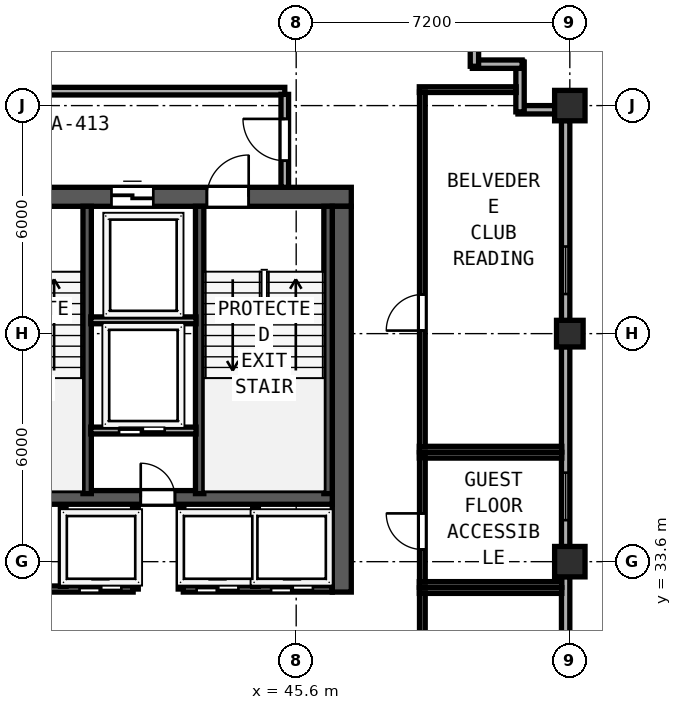
"""IFC4 building model, lengths in metres.
Left out: names, types, materials, properties, quantities, classifications, styles, units other than length and angle.
Written with IfcOpenShell. Run it as: python <this file> out.ifc"""

import sys

from ifc_helpers import new_model, si_unit, direction, frame, frame_2d, origin, origin_2d, place, context, subcontext, project, spatial, rectangle, hollow_rectangle, extrude, element, fill, save


model = new_model("IFC4")
c1 = context("Model", 3, precision=1e-05, world=origin(), true_north=direction((0.0, 1.0)))
c2 = subcontext(c1, "Body", "Model", "MODEL_VIEW")
j1 = project(units=[si_unit("LENGTHUNIT", "METRE"), si_unit("PLANEANGLEUNIT", "RADIAN")], contexts=[c1])
p1 = place(None, origin())
s1 = spatial("IfcSite", under=j1, at=p1, CompositionType="ELEMENT")
p2 = place(p1, origin())
s2 = spatial("IfcBuilding", under=s1, at=p2, CompositionType="ELEMENT")
p3 = place(p2, frame((0.0, 0.0, 239.05)))
s3 = spatial("IfcBuildingStorey", under=s2, at=p3, CompositionType="ELEMENT", Elevation=239.05)
p4 = place(p3, frame((29.75, 43.2, 0.0), z_axis=(0.0, 0.0, 1.0), x_axis=(1.0, 0.0, 0.0)))
e1 = element("IfcWall", 1, at=p4, inside=s3, PredefinedType="SHEAR", context=c2, shape_type="SweptSolid", body=[
    extrude(rectangle(XDim=17.3, YDim=0.5, at=frame_2d((8.65, 0.0))), origin(), (0.0, 0.0, 1.0), 3.67),
])
p5 = place(p4, frame((2.3, 0.0, 0.0)))
e2 = element("IfcOpeningElement", 2, at=p5, cuts=e1, PredefinedType="OPENING", context=c2, shape_type="SweptSolid", body=[
    extrude(rectangle(XDim=1.1, YDim=2.15, at=frame_2d((0.55, 1.075))), frame((0.0, 0.26, 0.0), z_axis=(0.0, -1.0, 0.0), x_axis=(1.0, 0.0, 0.0)), (0.0, 0.0, 1.0), 0.52),
])
p6 = place(p4, frame((7.41, 0.0, 0.0)))
e3 = element("IfcOpeningElement", 3, at=p6, cuts=e1, PredefinedType="OPENING", context=c2, shape_type="SweptSolid", body=[
    extrude(rectangle(XDim=1.1, YDim=2.15, at=frame_2d((0.55, 1.075))), frame((0.0, 0.26, 0.0), z_axis=(0.0, -1.0, 0.0), x_axis=(1.0, 0.0, 0.0)), (0.0, 0.0, 1.0), 0.52),
])
p7 = place(p4, frame((13.5, 0.0, 0.0)))
e4 = element("IfcOpeningElement", 4, at=p7, cuts=e1, PredefinedType="OPENING", context=c2, shape_type="SweptSolid", body=[
    extrude(rectangle(XDim=1.1, YDim=2.15, at=frame_2d((0.55, 1.075))), frame((0.0, 0.26, 0.0), z_axis=(0.0, -1.0, 0.0), x_axis=(1.0, 0.0, 0.0)), (0.0, 0.0, 1.0), 0.52),
])
p8 = place(p4, frame((4.63, 0.0, 0.0)))
e5 = element("IfcOpeningElement", 5, at=p8, cuts=e1, PredefinedType="OPENING", context=c2, shape_type="SweptSolid", body=[
    extrude(rectangle(XDim=1.1, YDim=2.2, at=frame_2d((0.55, 1.1))), frame((0.0, 0.26, 0.0), z_axis=(0.0, -1.0, 0.0), x_axis=(1.0, 0.0, 0.0)), (0.0, 0.0, 1.0), 0.52),
])
p9 = place(p4, frame((10.99, 0.0, 0.0)))
e6 = element("IfcOpeningElement", 6, at=p9, cuts=e1, PredefinedType="OPENING", context=c2, shape_type="SweptSolid", body=[
    extrude(rectangle(XDim=1.1, YDim=2.2, at=frame_2d((0.55, 1.1))), frame((0.0, 0.26, 0.0), z_axis=(0.0, -1.0, 0.0), x_axis=(1.0, 0.0, 0.0)), (0.0, 0.0, 1.0), 0.52),
])
p10 = place(p3, frame((46.8, 32.8, 0.0), z_axis=(0.0, 0.0, 1.0), x_axis=(0.0, 1.0, 0.0)))
e7 = element("IfcWall", 7, at=p10, inside=s3, PredefinedType="SHEAR", context=c2, shape_type="SweptSolid", body=[
    extrude(rectangle(XDim=10.15, YDim=0.5, at=frame_2d((5.075, 0.0))), origin(), (0.0, 0.0, 1.0), 3.67),
])
p11 = place(p3, frame((30.25, 35.29, 0.0), z_axis=(0.0, 0.0, 1.0), x_axis=(1.0, 0.0, 0.0)))
e8 = element("IfcWall", 8, at=p11, inside=s3, PredefinedType="SHEAR", context=c2, shape_type="SweptSolid", body=[
    extrude(rectangle(XDim=16.3, YDim=0.36, at=frame_2d((8.15, 0.0))), origin(), (0.0, 0.0, 1.0), 3.67),
])
p12 = place(p11, frame((5.1, 0.0, 0.0), z_axis=(0.0, 0.0, 1.0), x_axis=(-1.0, 0.0, 0.0)))
e9 = element("IfcOpeningElement", 9, at=p12, cuts=e8, PredefinedType="OPENING", context=c2, shape_type="SweptSolid", body=[
    extrude(rectangle(XDim=0.9, YDim=2.1, at=frame_2d((0.45, 1.05))), frame((0.0, 0.19, 0.0), z_axis=(0.0, -1.0, 0.0), x_axis=(1.0, 0.0, 0.0)), (0.0, 0.0, 1.0), 0.38),
])
p13 = place(p11, frame((12.16, 0.0, 0.0), z_axis=(0.0, 0.0, 1.0), x_axis=(-1.0, 0.0, 0.0)))
e10 = element("IfcOpeningElement", 10, at=p13, cuts=e8, PredefinedType="OPENING", context=c2, shape_type="SweptSolid", body=[
    extrude(rectangle(XDim=0.9, YDim=2.1, at=frame_2d((0.45, 1.05))), frame((0.0, 0.19, 0.0), z_axis=(0.0, -1.0, 0.0), x_axis=(1.0, 0.0, 0.0)), (0.0, 0.0, 1.0), 0.38),
])
for number, where, z_axis, x_axis in (
    (11, (40.1, 35.39, 0.0), (0.0, 0.0, 1.0), (0.0, 1.0, 0.0)),
    (12, (43.06, 35.39, 0.0), (0.0, 0.0, 1.0), (0.0, 1.0, 0.0)),
    (13, (46.438, 35.39, 0.0), (0.0, 0.0, 1.0), (0.0, 1.0, 0.0)),
):
    element("IfcWall", number, at=place(p3, frame(where, z_axis=z_axis, x_axis=x_axis)), inside=s3, PredefinedType="SHEAR", context=c2, shape_type="SweptSolid", body=[
        extrude(rectangle(XDim=7.56, YDim=0.22, at=frame_2d((3.78, 0.0))), origin(), (0.0, 0.0, 1.0), 3.67),
    ])
for number, where, z_axis, x_axis in (
    (14, (52.8, 33.6, 0.0), (0.0, 0.0, 1.0), (1.0, 0.0, 0.0)),
    (15, (52.8, 45.6, 0.0), (0.0, 0.0, 1.0), (1.0, 0.0, 0.0)),
):
    element("IfcColumn", number, at=place(p3, frame(where, z_axis=z_axis, x_axis=x_axis)), inside=s3, PredefinedType="COLUMN", context=c2, shape_type="SweptSolid", body=[
        extrude(hollow_rectangle(XDim=0.8, YDim=0.8, WallThickness=0.03, at=origin_2d()), origin(), (0.0, 0.0, 1.0), 3.85),
    ])
p14 = place(p3, frame((52.8, 39.6, 0.0), z_axis=(0.0, 0.0, 1.0), x_axis=(1.0, 0.0, 0.0)))
e16 = element("IfcColumn", 16, at=p14, inside=s3, PredefinedType="COLUMN", context=c2, shape_type="SweptSolid", body=[
    extrude(hollow_rectangle(XDim=0.7, YDim=0.7, WallThickness=0.026, at=origin_2d()), origin(), (0.0, 0.0, 1.0), 3.85),
])
p15 = place(p3, frame((52.69, 27.942, 0.0), z_axis=(0.0, 0.0, 1.0), x_axis=(0.0, 1.0, 0.0)))
e17 = element("IfcWall", 17, at=p15, inside=s3, PredefinedType="SOLIDWALL", context=c2, shape_type="SweptSolid", body=[
    extrude(rectangle(XDim=5.266, YDim=0.22, at=frame_2d((2.633, 0.0))), origin(), (0.0, 0.0, 1.0), 3.315),
])
p16 = place(p15, frame((0.7, 0.0, 0.85)))
e18 = element("IfcOpeningElement", 18, at=p16, cuts=e17, PredefinedType="OPENING", context=c2, shape_type="SweptSolid", body=[
    extrude(rectangle(XDim=1.25, YDim=1.95, at=frame_2d((0.625, 0.975))), frame((0.0, 0.12, 0.0), z_axis=(0.0, -1.0, 0.0), x_axis=(1.0, 0.0, 0.0)), (0.0, 0.0, 1.0), 0.24),
])
p17 = place(p3, frame((52.69, 33.992, 0.0), z_axis=(0.0, 0.0, 1.0), x_axis=(0.0, 1.0, 0.0)))
e19 = element("IfcWall", 19, at=p17, inside=s3, PredefinedType="SOLIDWALL", context=c2, shape_type="SweptSolid", body=[
    extrude(rectangle(XDim=5.266, YDim=0.22, at=frame_2d((2.633, 0.0))), origin(), (0.0, 0.0, 1.0), 3.315),
])
p18 = place(p17, frame((0.7, 0.0, 0.85)))
e20 = element("IfcOpeningElement", 20, at=p18, cuts=e19, PredefinedType="OPENING", context=c2, shape_type="SweptSolid", body=[
    extrude(rectangle(XDim=1.25, YDim=1.95, at=frame_2d((0.625, 0.975))), frame((0.0, 0.12, 0.0), z_axis=(0.0, -1.0, 0.0), x_axis=(1.0, 0.0, 0.0)), (0.0, 0.0, 1.0), 0.24),
])
p19 = place(p3, frame((52.69, 39.942, 0.0), z_axis=(0.0, 0.0, 1.0), x_axis=(0.0, 1.0, 0.0)))
e21 = element("IfcWall", 21, at=p19, inside=s3, PredefinedType="SOLIDWALL", context=c2, shape_type="SweptSolid", body=[
    extrude(rectangle(XDim=5.266, YDim=0.22, at=frame_2d((2.633, 0.0))), origin(), (0.0, 0.0, 1.0), 3.315),
])
p20 = place(p19, frame((0.7, 0.0, 0.85)))
e22 = element("IfcOpeningElement", 22, at=p20, cuts=e21, PredefinedType="OPENING", context=c2, shape_type="SweptSolid", body=[
    extrude(rectangle(XDim=1.25, YDim=1.95, at=frame_2d((0.625, 0.975))), frame((0.0, 0.12, 0.0), z_axis=(0.0, -1.0, 0.0), x_axis=(1.0, 0.0, 0.0)), (0.0, 0.0, 1.0), 0.24),
])
p21 = place(p3, frame((52.408, 45.49, 0.0), z_axis=(0.0, 0.0, 1.0), x_axis=(-1.0, 0.0, 0.0)))
e23 = element("IfcWall", 23, at=p21, inside=s3, PredefinedType="SOLIDWALL", context=c2, shape_type="SweptSolid", body=[
    extrude(rectangle(XDim=0.973, YDim=0.22, at=frame_2d((0.486, 0.0))), origin(), (0.0, 0.0, 1.0), 3.67),
])
p22 = place(p3, frame((51.49, 45.435, 0.0), z_axis=(0.0, 0.0, 1.0), x_axis=(0.0, 1.0, 0.0)))
e24 = element("IfcWall", 24, at=p22, inside=s3, PredefinedType="SOLIDWALL", context=c2, shape_type="SweptSolid", body=[
    extrude(rectangle(XDim=1.31, YDim=0.22, at=frame_2d((0.655, 0.0))), origin(), (0.0, 0.0, 1.0), 3.67),
])
p23 = place(p3, frame((51.545, 46.69, 0.0), z_axis=(0.0, 0.0, 1.0), x_axis=(-1.0, 0.0, 0.0)))
e25 = element("IfcWall", 25, at=p23, inside=s3, PredefinedType="SOLIDWALL", context=c2, shape_type="SweptSolid", body=[
    extrude(rectangle(XDim=1.31, YDim=0.22, at=frame_2d((0.655, 0.0))), origin(), (0.0, 0.0, 1.0), 3.67),
])
p24 = place(p3, frame((50.29, 46.635, 0.0), z_axis=(0.0, 0.0, 1.0), x_axis=(0.0, 1.0, 0.0)))
e26 = element("IfcWall", 26, at=p24, inside=s3, PredefinedType="SOLIDWALL", context=c2, shape_type="SweptSolid", body=[
    extrude(rectangle(XDim=1.535, YDim=0.22, at=frame_2d((0.768, 0.0))), origin(), (0.0, 0.0, 1.0), 3.67),
])
p25 = place(p3, frame((31.5, 45.98, 0.0), z_axis=(0.0, 0.0, 1.0), x_axis=(1.0, 0.0, 0.0)))
e27 = element("IfcWall", 27, at=p25, inside=s3, PredefinedType="SOLIDWALL", context=c2, shape_type="SweptSolid", body=[
    extrude(rectangle(XDim=13.8, YDim=0.2, at=frame_2d((6.9, 0.0))), origin(), (0.0, 0.0, 1.0), 3.67),
])
p26 = place(p3, frame((45.3, 43.45, 0.0), z_axis=(0.0, 0.0, 1.0), x_axis=(0.0, 1.0, 0.0)))
e28 = element("IfcWall", 28, at=p26, inside=s3, PredefinedType="SOLIDWALL", context=c2, shape_type="SweptSolid", body=[
    extrude(rectangle(XDim=2.445, YDim=0.2, at=frame_2d((1.223, 0.0))), origin(), (0.0, 0.0, 1.0), 3.67),
])
p27 = place(p26, frame((0.7, 0.0, 0.0)))
e29 = element("IfcOpeningElement", 29, at=p27, cuts=e28, PredefinedType="OPENING", context=c2, shape_type="SweptSolid", body=[
    extrude(rectangle(XDim=1.1, YDim=2.15, at=frame_2d((0.55, 1.075))), frame((0.0, 0.11, 0.0), z_axis=(0.0, -1.0, 0.0), x_axis=(1.0, 0.0, 0.0)), (0.0, 0.0, 1.0), 0.22),
])
p28 = place(p3, frame((40.195, 39.95, 0.0), z_axis=(0.0, 0.0, 1.0), x_axis=(1.0, 0.0, 0.0)))
e30 = element("IfcWall", 30, at=p28, inside=s3, PredefinedType="SOLIDWALL", context=c2, shape_type="SweptSolid", body=[
    extrude(rectangle(XDim=2.77, YDim=0.18, at=frame_2d((1.385, 0.0))), origin(), (0.0, 0.0, 1.0), 3.67),
])
p29 = place(p3, frame((40.195, 37.05, 0.0), z_axis=(0.0, 0.0, 1.0), x_axis=(1.0, 0.0, 0.0)))
e31 = element("IfcWall", 31, at=p29, inside=s3, PredefinedType="SOLIDWALL", context=c2, shape_type="SweptSolid", body=[
    extrude(rectangle(XDim=2.77, YDim=0.18, at=frame_2d((1.385, 0.0))), origin(), (0.0, 0.0, 1.0), 3.67),
])
p30 = place(p29, frame((1.945, 0.0, 0.0), z_axis=(0.0, 0.0, 1.0), x_axis=(-1.0, 0.0, 0.0)))
e32 = element("IfcOpeningElement", 32, at=p30, cuts=e31, PredefinedType="OPENING", context=c2, shape_type="SweptSolid", body=[
    extrude(rectangle(XDim=1.2, YDim=2.2, at=frame_2d((0.6, 1.1))), frame((0.0, 0.1, 0.0), z_axis=(0.0, -1.0, 0.0), x_axis=(1.0, 0.0, 0.0)), (0.0, 0.0, 1.0), 0.2),
])
for number, where, z_axis, x_axis in (
    (33, (41.37, 32.88, 0.0), (0.0, 0.0, 1.0), (0.0, 1.0, 0.0)),
    (34, (42.57, 32.88, 0.0), (0.0, 0.0, 1.0), (0.0, 1.0, 0.0)),
):
    element("IfcWall", number, at=place(p3, frame(where, z_axis=z_axis, x_axis=x_axis)), inside=s3, PredefinedType="SOLIDWALL", context=c2, shape_type="SweptSolid", body=[
        extrude(rectangle(XDim=2.17, YDim=0.15, at=frame_2d((1.085, 0.0))), origin(), (0.0, 0.0, 1.0), 3.67),
    ])
p31 = place(p3, frame((35.57, 32.88, 0.0), z_axis=(0.0, 0.0, 1.0), x_axis=(1.0, 0.0, 0.0)))
e35 = element("IfcWall", 35, at=p31, inside=s3, PredefinedType="SOLIDWALL", context=c2, shape_type="SweptSolid", body=[
    extrude(rectangle(XDim=5.74, YDim=0.16, at=frame_2d((2.87, 0.0))), origin(), (0.0, 0.0, 1.0), 3.67),
])
p32 = place(p31, frame((1.49, 0.0, 0.0), z_axis=(0.0, 0.0, 1.0), x_axis=(-1.0, 0.0, 0.0)))
e36 = element("IfcOpeningElement", 36, at=p32, cuts=e35, PredefinedType="OPENING", context=c2, shape_type="SweptSolid", body=[
    extrude(rectangle(XDim=0.95, YDim=2.12, at=frame_2d((0.475, 1.06))), frame((0.0, 0.09, 0.0), z_axis=(0.0, -1.0, 0.0), x_axis=(1.0, 0.0, 0.0)), (0.0, 0.0, 1.0), 0.18),
])
p33 = place(p31, frame((5.43, 0.0, 0.0), z_axis=(0.0, 0.0, 1.0), x_axis=(-1.0, 0.0, 0.0)))
e37 = element("IfcOpeningElement", 37, at=p33, cuts=e35, PredefinedType="OPENING", context=c2, shape_type="SweptSolid", body=[
    extrude(rectangle(XDim=1.1, YDim=2.2, at=frame_2d((0.55, 1.1))), frame((0.0, 0.09, 0.0), z_axis=(0.0, -1.0, 0.0), x_axis=(1.0, 0.0, 0.0)), (0.0, 0.0, 1.0), 0.18),
])
p34 = place(p3, frame((42.63, 32.88, 0.0), z_axis=(0.0, 0.0, 1.0), x_axis=(1.0, 0.0, 0.0)))
e38 = element("IfcWall", 38, at=p34, inside=s3, PredefinedType="SOLIDWALL", context=c2, shape_type="SweptSolid", body=[
    extrude(rectangle(XDim=3.92, YDim=0.16, at=frame_2d((1.96, 0.0))), origin(), (0.0, 0.0, 1.0), 3.67),
])
p35 = place(p34, frame((1.45, 0.0, 0.0), z_axis=(0.0, 0.0, 1.0), x_axis=(-1.0, 0.0, 0.0)))
e39 = element("IfcOpeningElement", 39, at=p35, cuts=e38, PredefinedType="OPENING", context=c2, shape_type="SweptSolid", body=[
    extrude(rectangle(XDim=1.1, YDim=2.2, at=frame_2d((0.55, 1.1))), frame((0.0, 0.09, 0.0), z_axis=(0.0, -1.0, 0.0), x_axis=(1.0, 0.0, 0.0)), (0.0, 0.0, 1.0), 0.18),
])
p36 = place(p34, frame((3.41, 0.0, 0.0), z_axis=(0.0, 0.0, 1.0), x_axis=(-1.0, 0.0, 0.0)))
e40 = element("IfcOpeningElement", 40, at=p36, cuts=e38, PredefinedType="OPENING", context=c2, shape_type="SweptSolid", body=[
    extrude(rectangle(XDim=1.1, YDim=2.2, at=frame_2d((0.55, 1.1))), frame((0.0, 0.09, 0.0), z_axis=(0.0, -1.0, 0.0), x_axis=(1.0, 0.0, 0.0)), (0.0, 0.0, 1.0), 0.18),
])
for number, where, z_axis, x_axis in (
    (41, (39.47, 32.95, 0.0), (0.0, 0.0, 1.0), (0.0, 1.0, 0.0)),
    (42, (44.53, 32.95, 0.0), (0.0, 0.0, 1.0), (0.0, 1.0, 0.0)),
):
    element("IfcWall", number, at=place(p3, frame(where, z_axis=z_axis, x_axis=x_axis)), inside=s3, PredefinedType="SOLIDWALL", context=c2, shape_type="SweptSolid", body=[
        extrude(rectangle(XDim=2.05, YDim=0.15, at=frame_2d((1.025, 0.0))), origin(), (0.0, 0.0, 1.0), 3.67),
    ])
for number, where, z_axis, x_axis in (
    (43, (48.84, 36.4, 0.0), (0.0, 0.0, 1.0), (1.0, 0.0, 0.0)),
    (44, (48.84, 33.0, 0.0), (0.0, 0.0, 1.0), (1.0, 0.0, 0.0)),
):
    element("IfcWall", number, at=place(p3, frame(where, z_axis=z_axis, x_axis=x_axis)), inside=s3, PredefinedType="PARTITIONING", context=c2, shape_type="SweptSolid", body=[
        extrude(rectangle(XDim=3.748, YDim=0.15, at=frame_2d((1.874, 0.0))), origin(), (0.0, 0.0, 1.0), 3.67),
    ])
p37 = place(p3, frame((48.92, 33.06, 0.0), z_axis=(0.0, 0.0, 1.0), x_axis=(0.0, 1.0, 0.0)))
e45 = element("IfcWall", 45, at=p37, inside=s3, PredefinedType="PARTITIONING", context=c2, shape_type="SweptSolid", body=[
    extrude(rectangle(XDim=3.28, YDim=0.15, at=frame_2d((1.64, 0.0))), origin(), (0.0, 0.0, 1.0), 3.67),
])
p38 = place(p37, frame((0.86, 0.0, 0.0)))
e46 = element("IfcOpeningElement", 46, at=p38, cuts=e45, PredefinedType="OPENING", context=c2, shape_type="SweptSolid", body=[
    extrude(rectangle(XDim=0.95, YDim=2.12, at=frame_2d((0.475, 1.06))), frame((0.0, 0.085, 0.0), z_axis=(0.0, -1.0, 0.0), x_axis=(1.0, 0.0, 0.0)), (0.0, 0.0, 1.0), 0.17),
])
p39 = place(p3, frame((48.84, 46.02, 0.0), z_axis=(0.0, 0.0, 1.0), x_axis=(1.0, 0.0, 0.0)))
e47 = element("IfcWall", 47, at=p39, inside=s3, PredefinedType="PARTITIONING", context=c2, shape_type="SweptSolid", body=[
    extrude(rectangle(XDim=2.548, YDim=0.15, at=frame_2d((1.274, 0.0))), origin(), (0.0, 0.0, 1.0), 3.67),
])
p40 = place(p3, frame((48.84, 36.56, 0.0), z_axis=(0.0, 0.0, 1.0), x_axis=(1.0, 0.0, 0.0)))
e48 = element("IfcWall", 48, at=p40, inside=s3, PredefinedType="PARTITIONING", context=c2, shape_type="SweptSolid", body=[
    extrude(rectangle(XDim=3.748, YDim=0.15, at=frame_2d((1.874, 0.0))), origin(), (0.0, 0.0, 1.0), 3.67),
])
p41 = place(p3, frame((48.92, 36.62, 0.0), z_axis=(0.0, 0.0, 1.0), x_axis=(0.0, 1.0, 0.0)))
e49 = element("IfcWall", 49, at=p41, inside=s3, PredefinedType="PARTITIONING", context=c2, shape_type="SweptSolid", body=[
    extrude(rectangle(XDim=9.34, YDim=0.15, at=frame_2d((4.67, 0.0))), origin(), (0.0, 0.0, 1.0), 3.67),
])
p42 = place(p41, frame((3.06, 0.0, 0.0)))
e50 = element("IfcOpeningElement", 50, at=p42, cuts=e49, PredefinedType="OPENING", context=c2, shape_type="SweptSolid", body=[
    extrude(rectangle(XDim=0.95, YDim=2.12, at=frame_2d((0.475, 1.06))), frame((0.0, 0.085, 0.0), z_axis=(0.0, -1.0, 0.0), x_axis=(1.0, 0.0, 0.0)), (0.0, 0.0, 1.0), 0.17),
])
p43 = place(p3, frame((48.84, 32.84, 0.0), z_axis=(0.0, 0.0, 1.0), x_axis=(1.0, 0.0, 0.0)))
e51 = element("IfcWall", 51, at=p43, inside=s3, PredefinedType="PARTITIONING", context=c2, shape_type="SweptSolid", body=[
    extrude(rectangle(XDim=3.748, YDim=0.15, at=frame_2d((1.874, 0.0))), origin(), (0.0, 0.0, 1.0), 3.67),
])
p44 = place(p3, frame((48.92, 26.41, 0.0), z_axis=(0.0, 0.0, 1.0), x_axis=(0.0, 1.0, 0.0)))
e52 = element("IfcWall", 52, at=p44, inside=s3, PredefinedType="PARTITIONING", context=c2, shape_type="SweptSolid", body=[
    extrude(rectangle(XDim=6.37, YDim=0.15, at=frame_2d((3.185, 0.0))), origin(), (0.0, 0.0, 1.0), 3.67),
])
p45 = place(p44, frame((0.86, 0.0, 0.0)))
e53 = element("IfcOpeningElement", 53, at=p45, cuts=e52, PredefinedType="OPENING", context=c2, shape_type="SweptSolid", body=[
    extrude(rectangle(XDim=0.95, YDim=2.12, at=frame_2d((0.475, 1.06))), frame((0.0, 0.085, 0.0), z_axis=(0.0, -1.0, 0.0), x_axis=(1.0, 0.0, 0.0)), (0.0, 0.0, 1.0), 0.17),
])
p46 = place(p18, origin())
e54 = element("IfcWindow", 54, at=p46, inside=s3, PartitioningType="SINGLE_PANEL", PredefinedType="WINDOW", context=c2, shape_type="SweptSolid", body=[
    extrude(rectangle(XDim=1.25, YDim=1.95, at=frame_2d((0.625, 0.975))), frame((0.0, 0.03, 0.0), z_axis=(0.0, -1.0, 0.0), x_axis=(1.0, 0.0, 0.0)), (0.0, 0.0, 1.0), 0.06),
])
fill(e20, e54)
p47 = place(p20, origin())
e55 = element("IfcWindow", 55, at=p47, inside=s3, PartitioningType="SINGLE_PANEL", PredefinedType="WINDOW", context=c2, shape_type="SweptSolid", body=[
    extrude(rectangle(XDim=1.25, YDim=1.95, at=frame_2d((0.625, 0.975))), frame((0.0, 0.03, 0.0), z_axis=(0.0, -1.0, 0.0), x_axis=(1.0, 0.0, 0.0)), (0.0, 0.0, 1.0), 0.06),
])
fill(e22, e55)
p48 = place(p7, origin())
e56 = element("IfcDoor", 56, at=p48, inside=s3, OperationType="SINGLE_SWING_RIGHT", PredefinedType="DOOR", context=c2, shape_type="SweptSolid", body=[
    extrude(rectangle(XDim=1.1, YDim=2.15, at=frame_2d((0.55, 1.075))), frame((0.0, 0.185, 0.0), z_axis=(0.0, -1.0, 0.0), x_axis=(1.0, 0.0, 0.0)), (0.0, 0.0, 1.0), 0.05),
])
fill(e4, e56)
p49 = place(p27, origin())
e57 = element("IfcDoor", 57, at=p49, inside=s3, OperationType="SINGLE_SWING_RIGHT", PredefinedType="DOOR", context=c2, shape_type="SweptSolid", body=[
    extrude(rectangle(XDim=1.1, YDim=2.15, at=frame_2d((0.55, 1.075))), frame((0.0, 0.025, 0.0), z_axis=(0.0, -1.0, 0.0), x_axis=(1.0, 0.0, 0.0)), (0.0, 0.0, 1.0), 0.05),
])
fill(e29, e57)
p50 = place(p9, origin())
e58 = element("IfcDoor", 58, at=p50, inside=s3, OperationType="SLIDING_TO_LEFT", PredefinedType="DOOR", context=c2, shape_type="SweptSolid", body=[
    extrude(rectangle(XDim=1.1, YDim=2.2, at=frame_2d((0.55, 1.1))), frame((0.0, 0.185, 0.0), z_axis=(0.0, -1.0, 0.0), x_axis=(1.0, 0.0, 0.0)), (0.0, 0.0, 1.0), 0.05),
])
fill(e6, e58)
p51 = place(p30, origin())
e59 = element("IfcDoor", 59, at=p51, inside=s3, OperationType="SLIDING_TO_RIGHT", PredefinedType="DOOR", context=c2, shape_type="SweptSolid", body=[
    extrude(rectangle(XDim=1.2, YDim=2.2, at=frame_2d((0.6, 1.1))), frame((0.0, 0.025, 0.0), z_axis=(0.0, -1.0, 0.0), x_axis=(1.0, 0.0, 0.0)), (0.0, 0.0, 1.0), 0.05),
])
fill(e32, e59)
p52 = place(p13, origin())
e60 = element("IfcDoor", 60, at=p52, inside=s3, OperationType="SINGLE_SWING_RIGHT", PredefinedType="DOOR", context=c2, shape_type="SweptSolid", body=[
    extrude(rectangle(XDim=0.9, YDim=2.1, at=frame_2d((0.45, 1.05))), frame((0.0, 0.025, 0.0), z_axis=(0.0, -1.0, 0.0), x_axis=(1.0, 0.0, 0.0)), (0.0, 0.0, 1.0), 0.05),
])
fill(e10, e60)
p53 = place(p33, origin())
e61 = element("IfcDoor", 61, at=p53, inside=s3, OperationType="SLIDING_TO_RIGHT", PredefinedType="DOOR", context=c2, shape_type="SweptSolid", body=[
    extrude(rectangle(XDim=1.1, YDim=2.2, at=frame_2d((0.55, 1.1))), frame((0.0, 0.025, 0.0), z_axis=(0.0, -1.0, 0.0), x_axis=(1.0, 0.0, 0.0)), (0.0, 0.0, 1.0), 0.05),
])
fill(e37, e61)
p54 = place(p35, origin())
e62 = element("IfcDoor", 62, at=p54, inside=s3, OperationType="SLIDING_TO_RIGHT", PredefinedType="DOOR", context=c2, shape_type="SweptSolid", body=[
    extrude(rectangle(XDim=1.1, YDim=2.2, at=frame_2d((0.55, 1.1))), frame((0.0, 0.025, 0.0), z_axis=(0.0, -1.0, 0.0), x_axis=(1.0, 0.0, 0.0)), (0.0, 0.0, 1.0), 0.05),
])
fill(e39, e62)
p55 = place(p36, origin())
e63 = element("IfcDoor", 63, at=p55, inside=s3, OperationType="SLIDING_TO_RIGHT", PredefinedType="DOOR", context=c2, shape_type="SweptSolid", body=[
    extrude(rectangle(XDim=1.1, YDim=2.2, at=frame_2d((0.55, 1.1))), frame((0.0, 0.025, 0.0), z_axis=(0.0, -1.0, 0.0), x_axis=(1.0, 0.0, 0.0)), (0.0, 0.0, 1.0), 0.05),
])
fill(e40, e63)
p56 = place(p38, origin())
e64 = element("IfcDoor", 64, at=p56, inside=s3, OperationType="SINGLE_SWING_RIGHT", PredefinedType="DOOR", context=c2, shape_type="SweptSolid", body=[
    extrude(rectangle(XDim=0.95, YDim=2.12, at=frame_2d((0.475, 1.06))), frame((0.0, 0.025, 0.0), z_axis=(0.0, -1.0, 0.0), x_axis=(1.0, 0.0, 0.0)), (0.0, 0.0, 1.0), 0.05),
])
fill(e46, e64)
p57 = place(p42, origin())
e65 = element("IfcDoor", 65, at=p57, inside=s3, OperationType="SINGLE_SWING_LEFT", PredefinedType="DOOR", context=c2, shape_type="SweptSolid", body=[
    extrude(rectangle(XDim=0.95, YDim=2.12, at=frame_2d((0.475, 1.06))), frame((0.0, 0.025, 0.0), z_axis=(0.0, -1.0, 0.0), x_axis=(1.0, 0.0, 0.0)), (0.0, 0.0, 1.0), 0.05),
])
fill(e50, e65)
save(model, sys.argv[1])
